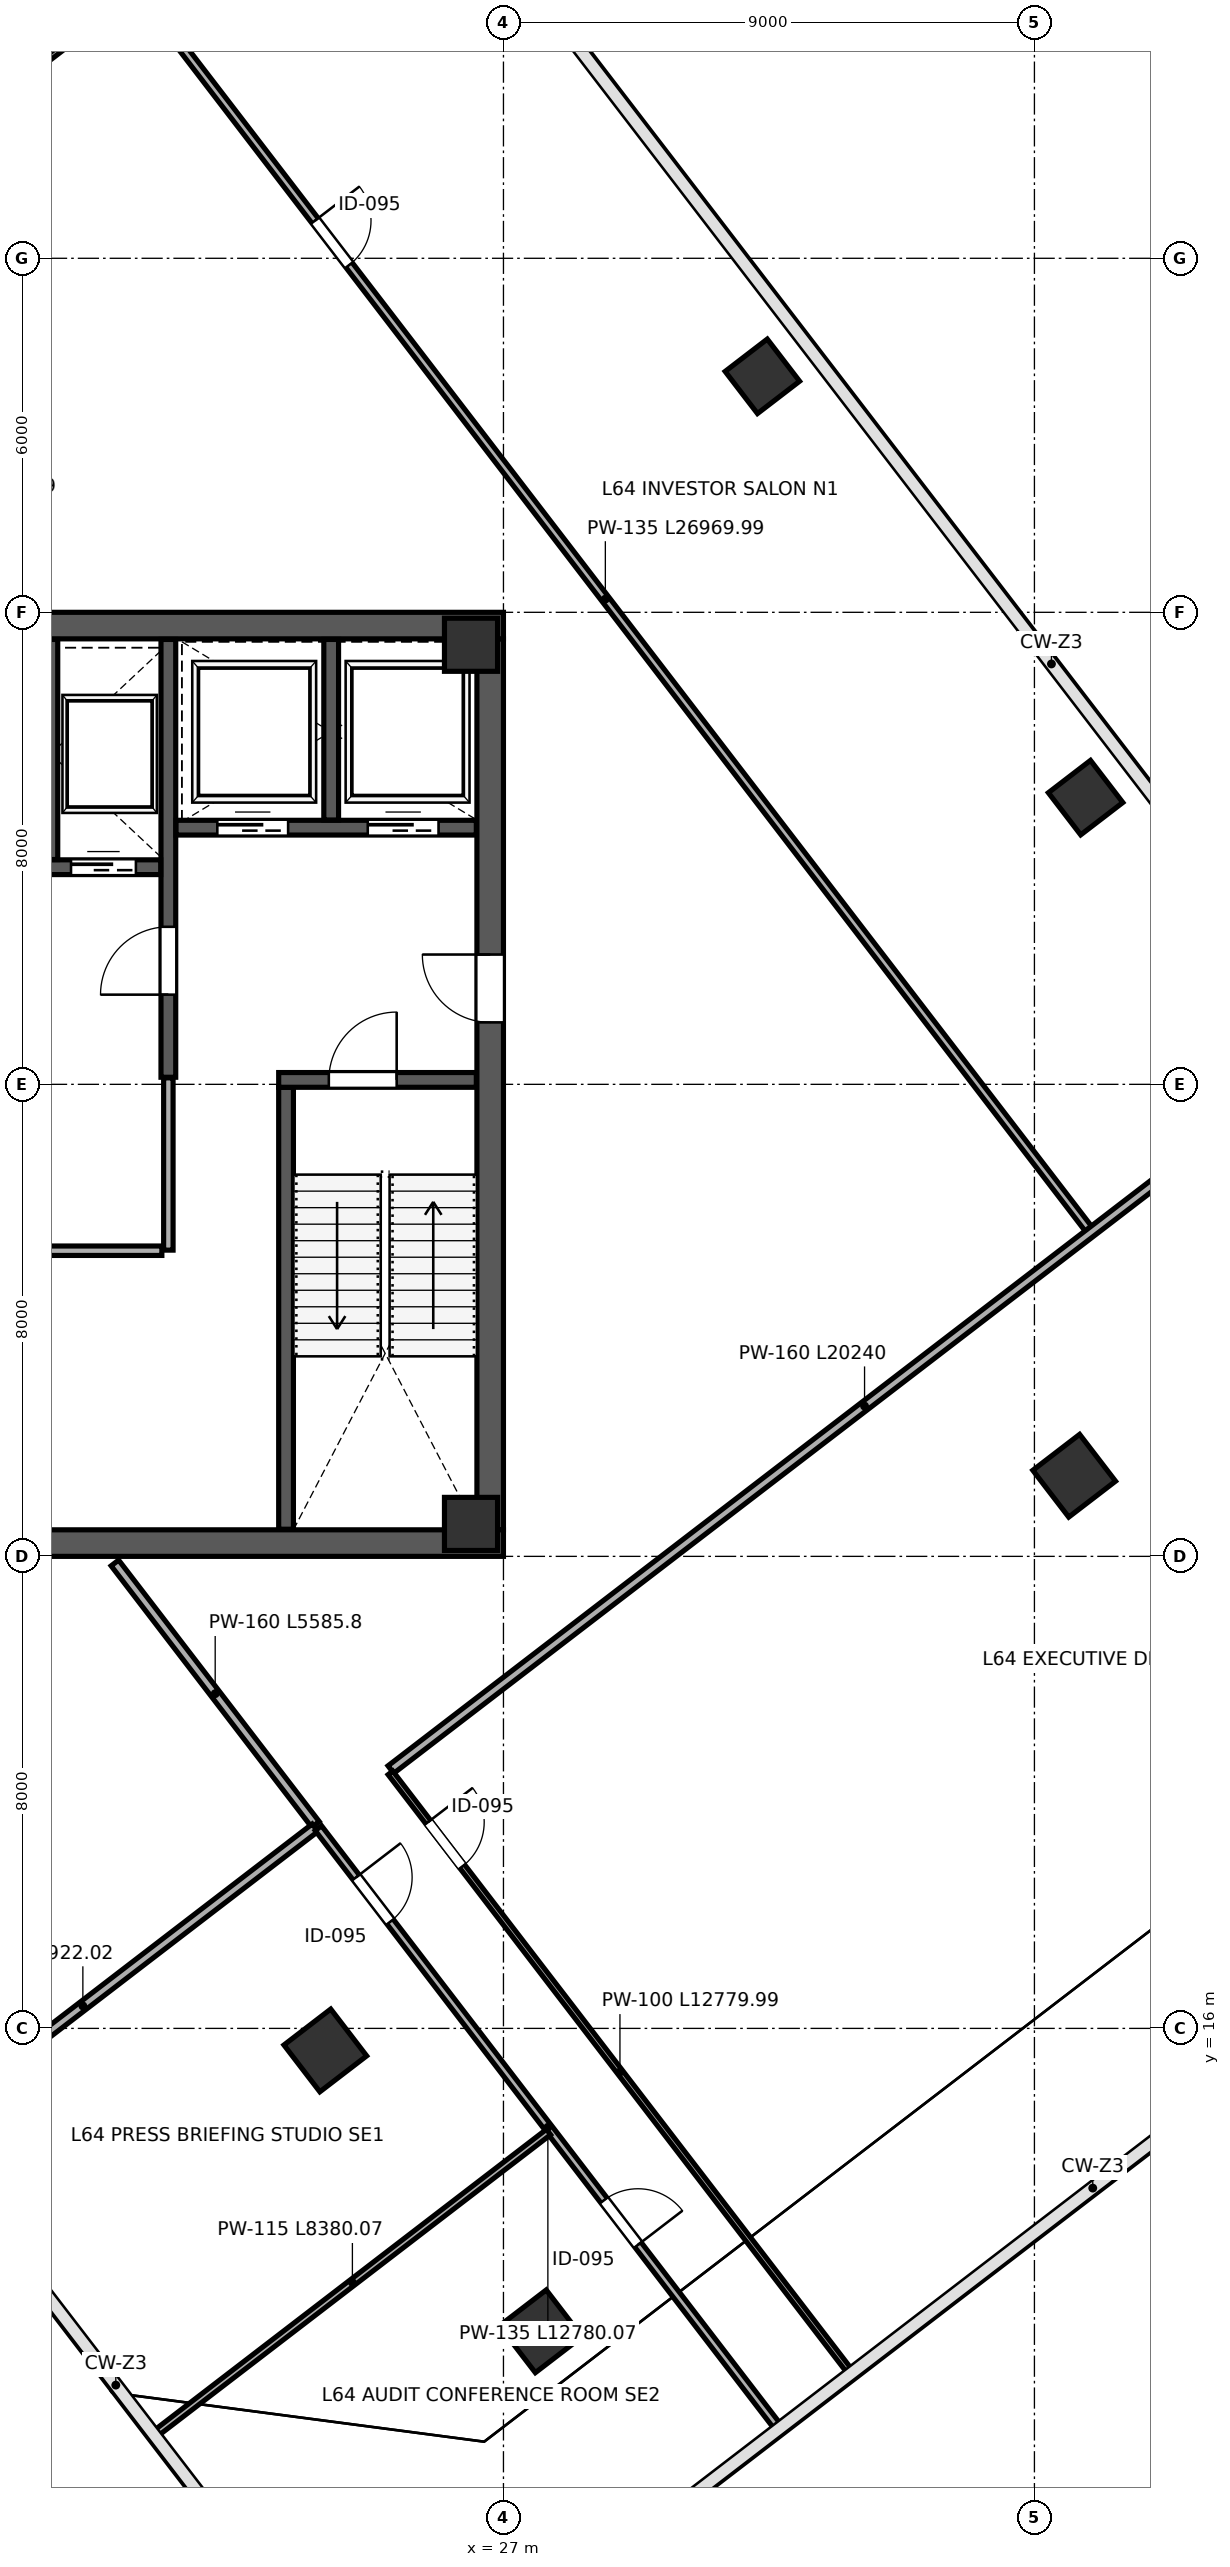
"""IFC4 building model, lengths in metres.
Left out: names, types, materials, properties, quantities, classifications, styles, units other than length and angle.
Written with IfcOpenShell. Run it as: python <this file> out.ifc"""

import sys

from ifc_helpers import new_model, si_unit, direction, frame, frame_2d, origin, origin_2d, place, context, subcontext, project, spatial, rectangle, extrude, source, transform, mapped, element, fill, save


model = new_model("IFC4")
c1 = context("Model", 3, precision=1e-05, world=origin(), true_north=direction((0.0, 1.0)))
c2 = subcontext(c1, "Body", "Model", "MODEL_VIEW")
j1 = project(units=[si_unit("LENGTHUNIT", "METRE"), si_unit("PLANEANGLEUNIT", "RADIAN")], contexts=[c1])
p1 = place(None, origin())
s1 = spatial("IfcSite", under=j1, at=p1, CompositionType="ELEMENT")
p2 = place(p1, origin())
s2 = spatial("IfcBuilding", under=s1, at=p2, CompositionType="ELEMENT")
p3 = place(p2, frame((0.0, 0.0, 283.6)))
s3 = spatial("IfcBuildingStorey", under=s2, at=p3, CompositionType="ELEMENT", Elevation=283.6)
m1 = source(origin(), c2, "Body", "SweptSolid", [
    extrude(rectangle(XDim=0.9, YDim=0.9, at=origin_2d()), origin(), (0.0, 0.0, 1.0), 4.198),
])
for number, where, z_axis, x_axis in (
    (1, (26.45, 24.55, 0.001), (0.0, 0.0, 1.0), (1.0, 0.0, 0.0)),
    (2, (26.45, 39.45, 0.001), (0.0, 0.0, 1.0), (1.0, 0.0, 0.0)),
):
    element("IfcColumn", number, at=place(p3, frame(where, z_axis=z_axis, x_axis=x_axis)), inside=s3, PredefinedType="COLUMN", context=c2, shape_type="MappedRepresentation", body=[
        mapped(m1, transform((0.0, 0.0, 0.0), scale=1.0)),
    ])
m2 = source(origin(), c2, "Body", "SweptSolid", [
    extrude(rectangle(XDim=0.9, YDim=0.9, at=origin_2d()), origin(), (0.0, 0.0, 1.0), 4.198),
])
for number, where, z_axis, x_axis in (
    (3, (31.389, 44.0, 0.001), (0.0, 0.0, 1.0), (-0.609, 0.793, 0.0)),
    (4, (36.867, 36.859, 0.001), (0.0, 0.0, 1.0), (-0.609, 0.793, 0.0)),
):
    element("IfcColumn", number, at=place(p3, frame(where, z_axis=z_axis, x_axis=x_axis)), inside=s3, PredefinedType="COLUMN", context=c2, shape_type="MappedRepresentation", body=[
        mapped(m2, transform((0.0, 0.0, 0.0), scale=1.0)),
    ])
m3 = source(origin(), c2, "Body", "SweptSolid", [
    extrude(rectangle(XDim=1.0, YDim=1.0, at=origin_2d()), origin(), (0.0, 0.0, 1.0), 4.198),
])
for number, where, z_axis, x_axis in (
    (5, (23.98, 15.626, 0.001), (0.0, 0.0, 1.0), (-0.609, 0.793, 0.0)),
    (6, (36.674, 25.366, 0.001), (0.0, 0.0, 1.0), (-0.609, 0.793, 0.0)),
):
    element("IfcColumn", number, at=place(p3, frame(where, z_axis=z_axis, x_axis=x_axis)), inside=s3, PredefinedType="COLUMN", context=c2, shape_type="MappedRepresentation", body=[
        mapped(m3, transform((0.0, 0.0, 0.0), scale=1.0)),
    ])
m4 = source(origin(), c2, "Body", "SweptSolid", [
    extrude(rectangle(XDim=1.0, YDim=1.0, at=origin_2d()), origin(), (0.0, 0.0, 1.0), 4.198),
])
p4 = place(p3, frame((27.633, 10.866, 0.001), z_axis=(0.0, 0.0, 1.0), x_axis=(-0.608761429009, 0.793353340291, 0.0)))
e7 = element("IfcColumn", 7, at=p4, inside=s3, PredefinedType="COLUMN", context=c2, shape_type="MappedRepresentation", body=[
    mapped(m4, transform((0.0, 0.0, 0.0), scale=1.0)),
])
p5 = place(p3, frame((26.775, 24.45, 0.0), z_axis=(0.0, 0.0, 1.0), x_axis=(0.0, 1.0, 0.0)))
e8 = element("IfcWall", 8, at=p5, inside=s3, PredefinedType="SHEAR", context=c2, shape_type="SweptSolid", body=[
    extrude(rectangle(XDim=15.1, YDim=0.45, at=frame_2d((7.55, 0.0))), origin(), (0.0, 0.0, 1.0), 3.92),
])
p6 = place(p5, frame((8.6, 0.0, 0.0)))
e9 = element("IfcOpeningElement", 9, at=p6, cuts=e8, PredefinedType="OPENING", context=c2, shape_type="SweptSolid", body=[
    extrude(rectangle(XDim=1.15, YDim=2.2, at=frame_2d((0.575, 1.1))), frame((0.0, 0.235, 0.0), z_axis=(0.0, -1.0, 0.0), x_axis=(1.0, 0.0, 0.0)), (0.0, 0.0, 1.0), 0.47),
])
for number, where, z_axis, x_axis in (
    (10, (9.0, 24.225, 0.0), (0.0, 0.0, 1.0), (1.0, 0.0, 0.0)),
    (11, (9.0, 39.775, 0.0), (0.0, 0.0, 1.0), (1.0, 0.0, 0.0)),
):
    element("IfcWall", number, at=place(p3, frame(where, z_axis=z_axis, x_axis=x_axis)), inside=s3, PredefinedType="SHEAR", context=c2, shape_type="SweptSolid", body=[
        extrude(rectangle(XDim=18.0, YDim=0.45, at=frame_2d((9.0, 0.0))), origin(), (0.0, 0.0, 1.0), 3.92),
    ])
p7 = place(p3, frame((23.315, 24.46, 0.0), z_axis=(0.0, 0.0, 1.0), x_axis=(0.0, 1.0, 0.0)))
e12 = element("IfcWall", 12, at=p7, inside=s3, PredefinedType="SHEAR", context=c2, shape_type="SweptSolid", body=[
    extrude(rectangle(XDim=7.49, YDim=0.25, at=frame_2d((3.745, 0.0))), origin(), (0.0, 0.0, 1.0), 3.92),
])
p8 = place(p3, frame((23.19, 32.075, 0.0), z_axis=(0.0, 0.0, 1.0), x_axis=(1.0, 0.0, 0.0)))
e13 = element("IfcWall", 13, at=p8, inside=s3, PredefinedType="SHEAR", context=c2, shape_type="SweptSolid", body=[
    extrude(rectangle(XDim=3.35, YDim=0.25, at=frame_2d((1.675, 0.0))), origin(), (0.0, 0.0, 1.0), 3.92),
])
p9 = place(p8, frame((0.85, 0.0, 0.0)))
e14 = element("IfcOpeningElement", 14, at=p9, cuts=e13, PredefinedType="OPENING", context=c2, shape_type="SweptSolid", body=[
    extrude(rectangle(XDim=1.15, YDim=2.2, at=frame_2d((0.575, 1.1))), frame((0.0, 0.135, 0.0), z_axis=(0.0, -1.0, 0.0), x_axis=(1.0, 0.0, 0.0)), (0.0, 0.0, 1.0), 0.27),
])
p10 = place(p3, frame((21.32, 32.12, 0.0), z_axis=(0.0, 0.0, 1.0), x_axis=(0.0, 1.0, 0.0)))
e15 = element("IfcWall", 15, at=p10, inside=s3, PredefinedType="SHEAR", context=c2, shape_type="SweptSolid", body=[
    extrude(rectangle(XDim=7.42, YDim=0.25, at=frame_2d((3.71, 0.0))), origin(), (0.0, 0.0, 1.0), 3.92),
])
p11 = place(p10, frame((1.4, 0.0, 0.0)))
e16 = element("IfcOpeningElement", 16, at=p11, cuts=e15, PredefinedType="OPENING", context=c2, shape_type="SweptSolid", body=[
    extrude(rectangle(XDim=1.15, YDim=2.2, at=frame_2d((0.575, 1.1))), frame((0.0, 0.135, 0.0), z_axis=(0.0, -1.0, 0.0), x_axis=(1.0, 0.0, 0.0)), (0.0, 0.0, 1.0), 0.27),
])
p12 = place(p3, frame((21.45, 36.35, 0.0), z_axis=(0.0, 0.0, 1.0), x_axis=(1.0, 0.0, 0.0)))
e17 = element("IfcWall", 17, at=p12, inside=s3, PredefinedType="SHEAR", context=c2, shape_type="SweptSolid", body=[
    extrude(rectangle(XDim=5.09, YDim=0.25, at=frame_2d((2.545, 0.0))), origin(), (0.0, 0.0, 1.0), 3.92),
])
p13 = place(p12, frame((0.7, 0.0, 0.0)))
e18 = element("IfcOpeningElement", 18, at=p13, cuts=e17, PredefinedType="OPENING", context=c2, shape_type="SweptSolid", body=[
    extrude(rectangle(XDim=1.2, YDim=2.2, at=frame_2d((0.6, 1.1))), frame((0.0, 0.135, 0.0), z_axis=(0.0, -1.0, 0.0), x_axis=(1.0, 0.0, 0.0)), (0.0, 0.0, 1.0), 0.27),
])
p14 = place(p12, frame((3.25, 0.0, 0.0)))
e19 = element("IfcOpeningElement", 19, at=p14, cuts=e17, PredefinedType="OPENING", context=c2, shape_type="SweptSolid", body=[
    extrude(rectangle(XDim=1.2, YDim=2.2, at=frame_2d((0.6, 1.1))), frame((0.0, 0.135, 0.0), z_axis=(0.0, -1.0, 0.0), x_axis=(1.0, 0.0, 0.0)), (0.0, 0.0, 1.0), 0.27),
])
p15 = place(p3, frame((24.08, 36.48, 0.0), z_axis=(0.0, 0.0, 1.0), x_axis=(0.0, 1.0, 0.0)))
e20 = element("IfcWall", 20, at=p15, inside=s3, PredefinedType="SHEAR", context=c2, shape_type="SweptSolid", body=[
    extrude(rectangle(XDim=3.06, YDim=0.25, at=frame_2d((1.53, 0.0))), origin(), (0.0, 0.0, 1.0), 3.92),
])
p16 = place(p3, frame((17.32, 35.68, 0.0), z_axis=(0.0, 0.0, 1.0), x_axis=(1.0, 0.0, 0.0)))
e21 = element("IfcWall", 21, at=p16, inside=s3, PredefinedType="SHEAR", context=c2, shape_type="SweptSolid", body=[
    extrude(rectangle(XDim=3.87, YDim=0.25, at=frame_2d((1.935, 0.0))), origin(), (0.0, 0.0, 1.0), 3.92),
])
p17 = place(p16, frame((0.45, 0.0, 0.0)))
e22 = element("IfcOpeningElement", 22, at=p17, cuts=e21, PredefinedType="OPENING", context=c2, shape_type="SweptSolid", body=[
    extrude(rectangle(XDim=1.1, YDim=2.2, at=frame_2d((0.55, 1.1))), frame((0.0, 0.135, 0.0), z_axis=(0.0, -1.0, 0.0), x_axis=(1.0, 0.0, 0.0)), (0.0, 0.0, 1.0), 0.27),
])
p18 = place(p16, frame((2.35, 0.0, 0.0)))
e23 = element("IfcOpeningElement", 23, at=p18, cuts=e21, PredefinedType="OPENING", context=c2, shape_type="SweptSolid", body=[
    extrude(rectangle(XDim=1.1, YDim=2.2, at=frame_2d((0.55, 1.1))), frame((0.0, 0.135, 0.0), z_axis=(0.0, -1.0, 0.0), x_axis=(1.0, 0.0, 0.0)), (0.0, 0.0, 1.0), 0.27),
])
p19 = place(p3, frame((19.32, 35.81, 0.0), z_axis=(0.0, 0.0, 1.0), x_axis=(0.0, 1.0, 0.0)))
e24 = element("IfcWall", 24, at=p19, inside=s3, PredefinedType="SHEAR", context=c2, shape_type="SweptSolid", body=[
    extrude(rectangle(XDim=3.73, YDim=0.25, at=frame_2d((1.865, 0.0))), origin(), (0.0, 0.0, 1.0), 3.92),
])
p20 = place(p3, frame((12.84, 29.18, 0.0), z_axis=(0.0, 0.0, 1.0), x_axis=(1.0, 0.0, 0.0)))
e25 = element("IfcWall", 25, at=p20, inside=s3, PredefinedType="PARTITIONING", context=c2, shape_type="SweptSolid", body=[
    extrude(rectangle(XDim=8.37, YDim=0.16, at=frame_2d((4.185, 0.0))), origin(), (0.0, 0.0, 1.0), 3.92),
])
p21 = place(p20, frame((2.6, 0.0, 0.0)))
e26 = element("IfcOpeningElement", 26, at=p21, cuts=e25, PredefinedType="OPENING", context=c2, shape_type="SweptSolid", body=[
    extrude(rectangle(XDim=0.9, YDim=2.15, at=frame_2d((0.45, 1.075))), frame((0.0, 0.09, 0.0), z_axis=(0.0, -1.0, 0.0), x_axis=(1.0, 0.0, 0.0)), (0.0, 0.0, 1.0), 0.18),
])
p22 = place(p3, frame((21.32, 29.19, 0.0), z_axis=(0.0, 0.0, 1.0), x_axis=(0.0, 1.0, 0.0)))
e27 = element("IfcWall", 27, at=p22, inside=s3, PredefinedType="PARTITIONING", context=c2, shape_type="SweptSolid", body=[
    extrude(rectangle(XDim=2.92, YDim=0.16, at=frame_2d((1.46, 0.0))), origin(), (0.0, 0.0, 1.0), 3.92),
])
p23 = place(p3, frame((20.414, 23.888, 0.0), z_axis=(0.0, 0.0, 1.0), x_axis=(0.608740736079, -0.793369218106, 0.0)))
e28 = element("IfcWall", 28, at=p23, inside=s3, PredefinedType="PARTITIONING", context=c2, shape_type="SweptSolid", body=[
    extrude(rectangle(XDim=5.585, YDim=0.16, at=frame_2d((2.793, 0.0))), origin(), (0.0, 0.0, 1.0), 3.92),
])
p24 = place(p3, frame((20.518, 50.922, 0.0), z_axis=(0.0, 0.0, 1.0), x_axis=(0.608759693778, -0.793354671778, 0.0)))
e29 = element("IfcWall", 29, at=p24, inside=s3, PredefinedType="PARTITIONING", context=c2, shape_type="SweptSolid", body=[
    extrude(rectangle(XDim=26.97, YDim=0.135, at=frame_2d((13.485, 0.0))), origin(), (0.0, 0.0, 1.0), 3.92),
])
p25 = place(p24, frame((5.4, 0.0, 0.0)))
e30 = element("IfcOpeningElement", 30, at=p25, cuts=e29, PredefinedType="OPENING", context=c2, shape_type="SweptSolid", body=[
    extrude(rectangle(XDim=0.95, YDim=2.15, at=frame_2d((0.475, 1.075))), frame((0.0, 0.078, 0.0), z_axis=(0.0, -1.0, 0.0), x_axis=(1.0, 0.0, 0.0)), (0.0, 0.0, 1.0), 0.155),
])
p26 = place(p3, frame((1.519, 35.764, 0.0), z_axis=(0.0, 0.0, 1.0), x_axis=(0.793353184068, 0.608761632602, 0.0)))
e31 = element("IfcWall", 31, at=p26, inside=s3, PredefinedType="PARTITIONING", context=c2, shape_type="SweptSolid", body=[
    extrude(rectangle(XDim=27.572, YDim=0.1, at=frame_2d((13.786, 0.0))), origin(), (0.0, 0.0, 1.0), 3.92),
])
p27 = place(p3, frame((25.092, 20.387, 0.0), z_axis=(0.0, 0.0, 1.0), x_axis=(0.793357014217, 0.608756641025, 0.0)))
e32 = element("IfcWall", 32, at=p27, inside=s3, PredefinedType="PARTITIONING", context=c2, shape_type="SweptSolid", body=[
    extrude(rectangle(XDim=20.24, YDim=0.16, at=frame_2d((10.12, 0.0))), origin(), (0.0, 0.0, 1.0), 3.155),
])
p28 = place(p3, frame((15.935, 13.361, 0.0), z_axis=(0.0, 0.0, 1.0), x_axis=(0.793355203048, 0.608759001409, 0.0)))
e33 = element("IfcWall", 33, at=p28, inside=s3, PredefinedType="PARTITIONING", context=c2, shape_type="SweptSolid", body=[
    extrude(rectangle(XDim=9.922, YDim=0.16, at=frame_2d((4.961, 0.0))), origin(), (0.0, 0.0, 1.0), 3.92),
])
p29 = place(p3, frame((25.085, 20.331, 0.0), z_axis=(0.0, 0.0, 1.0), x_axis=(0.608748325205, -0.793363395022, 0.0)))
e34 = element("IfcWall", 34, at=p29, inside=s3, PredefinedType="PARTITIONING", context=c2, shape_type="SweptSolid", body=[
    extrude(rectangle(XDim=12.78, YDim=0.1, at=frame_2d((6.39, 0.0))), origin(), (0.0, 0.0, 1.0), 3.212),
])
p30 = place(p29, frame((1.05, 0.0, 0.0)))
e35 = element("IfcOpeningElement", 35, at=p30, cuts=e34, PredefinedType="OPENING", context=c2, shape_type="SweptSolid", body=[
    extrude(rectangle(XDim=0.95, YDim=2.15, at=frame_2d((0.475, 1.075))), frame((0.0, 0.06, 0.0), z_axis=(0.0, -1.0, 0.0), x_axis=(1.0, 0.0, 0.0)), (0.0, 0.0, 1.0), 0.12),
])
p31 = place(p3, frame((23.863, 19.393, 0.0), z_axis=(0.0, 0.0, 1.0), x_axis=(0.608748325205, -0.793363395022, 0.0)))
e36 = element("IfcWall", 36, at=p31, inside=s3, PredefinedType="PARTITIONING", context=c2, shape_type="SweptSolid", body=[
    extrude(rectangle(XDim=12.78, YDim=0.135, at=frame_2d((6.39, 0.0))), origin(), (0.0, 0.0, 1.0), 3.212),
])
p32 = place(p31, frame((1.05, 0.0, 0.0)))
e37 = element("IfcOpeningElement", 37, at=p32, cuts=e36, PredefinedType="OPENING", context=c2, shape_type="SweptSolid", body=[
    extrude(rectangle(XDim=0.95, YDim=2.15, at=frame_2d((0.475, 1.075))), frame((0.0, 0.078, 0.0), z_axis=(0.0, -1.0, 0.0), x_axis=(1.0, 0.0, 0.0)), (0.0, 0.0, 1.0), 0.155),
])
p33 = place(p31, frame((7.95, 0.0, 0.0)))
e38 = element("IfcOpeningElement", 38, at=p33, cuts=e36, PredefinedType="OPENING", context=c2, shape_type="SweptSolid", body=[
    extrude(rectangle(XDim=0.95, YDim=2.15, at=frame_2d((0.475, 1.075))), frame((0.0, 0.078, 0.0), z_axis=(0.0, -1.0, 0.0), x_axis=(1.0, 0.0, 0.0)), (0.0, 0.0, 1.0), 0.155),
])
p34 = place(p3, frame((21.115, 9.142, 0.0), z_axis=(0.0, 0.0, 1.0), x_axis=(0.793351209169, 0.608764206331, 0.0)))
e39 = element("IfcWall", 39, at=p34, inside=s3, PredefinedType="PARTITIONING", context=c2, shape_type="SweptSolid", body=[
    extrude(rectangle(XDim=8.38, YDim=0.115, at=frame_2d((4.19, 0.0))), origin(), (0.0, 0.0, 1.0), 3.92),
])
m5 = source(origin(), c2, "Body", "SweptSolid", [
    extrude(rectangle(XDim=1.15, YDim=2.2, at=frame_2d((0.575, 1.1))), frame((0.0, 0.025, 0.0), z_axis=(0.0, -1.0, 0.0), x_axis=(1.0, 0.0, 0.0)), (0.0, 0.0, 1.0), 0.05),
])
p35 = place(p11, origin())
e40 = element("IfcDoor", 40, at=p35, inside=s3, OperationType="SINGLE_SWING_LEFT", PredefinedType="DOOR", context=c2, shape_type="MappedRepresentation", body=[
    mapped(m5, transform((0.0, 0.0, 0.0), scale=1.0)),
])
fill(e16, e40)
m6 = source(origin(), c2, "Body", "SweptSolid", [
    extrude(rectangle(XDim=1.15, YDim=2.2, at=frame_2d((0.575, 1.1))), frame((0.0, 0.025, 0.0), z_axis=(0.0, -1.0, 0.0), x_axis=(1.0, 0.0, 0.0)), (0.0, 0.0, 1.0), 0.05),
])
p36 = place(p9, origin())
e41 = element("IfcDoor", 41, at=p36, inside=s3, OperationType="SINGLE_SWING_RIGHT", PredefinedType="DOOR", context=c2, shape_type="MappedRepresentation", body=[
    mapped(m6, transform((0.0, 0.0, 0.0), scale=1.0)),
])
fill(e14, e41)
p37 = place(p6, origin())
e42 = element("IfcDoor", 42, at=p37, inside=s3, OperationType="SINGLE_SWING_RIGHT", PredefinedType="DOOR", context=c2, shape_type="MappedRepresentation", body=[
    mapped(m5, transform((0.0, 0.0, 0.0), scale=1.0)),
])
fill(e9, e42)
m7 = source(origin(), c2, "Body", "SweptSolid", [
    extrude(rectangle(XDim=1.1, YDim=2.2, at=frame_2d((0.55, 1.1))), frame((0.0, 0.025, 0.0), z_axis=(0.0, -1.0, 0.0), x_axis=(1.0, 0.0, 0.0)), (0.0, 0.0, 1.0), 0.05),
])
p38 = place(p18, origin())
e43 = element("IfcDoor", 43, at=p38, inside=s3, OperationType="SLIDING_TO_RIGHT", PredefinedType="DOOR", context=c2, shape_type="MappedRepresentation", body=[
    mapped(m7, transform((0.0, 0.0, 0.0), scale=1.0)),
])
fill(e23, e43)
m8 = source(origin(), c2, "Body", "SweptSolid", [
    extrude(rectangle(XDim=1.2, YDim=2.2, at=frame_2d((0.6, 1.1))), frame((0.0, 0.025, 0.0), z_axis=(0.0, -1.0, 0.0), x_axis=(1.0, 0.0, 0.0)), (0.0, 0.0, 1.0), 0.05),
])
p39 = place(p13, origin())
e44 = element("IfcDoor", 44, at=p39, inside=s3, OperationType="SLIDING_TO_LEFT", PredefinedType="DOOR", context=c2, shape_type="MappedRepresentation", body=[
    mapped(m8, transform((0.0, 0.0, 0.0), scale=1.0)),
])
fill(e18, e44)
p40 = place(p14, origin())
e45 = element("IfcDoor", 45, at=p40, inside=s3, OperationType="SLIDING_TO_RIGHT", PredefinedType="DOOR", context=c2, shape_type="MappedRepresentation", body=[
    mapped(m8, transform((0.0, 0.0, 0.0), scale=1.0)),
])
fill(e19, e45)
m9 = source(origin(), c2, "Body", "SweptSolid", [
    extrude(rectangle(XDim=0.95, YDim=2.15, at=frame_2d((0.475, 1.075))), frame((0.0, 0.025, 0.0), z_axis=(0.0, -1.0, 0.0), x_axis=(1.0, 0.0, 0.0)), (0.0, 0.0, 1.0), 0.05),
])
p41 = place(p25, origin())
e46 = element("IfcDoor", 46, at=p41, inside=s3, OperationType="SINGLE_SWING_LEFT", PredefinedType="DOOR", context=c2, shape_type="MappedRepresentation", body=[
    mapped(m9, transform((0.0, 0.0, 0.0), scale=1.0)),
])
fill(e30, e46)
p42 = place(p30, origin())
e47 = element("IfcDoor", 47, at=p42, inside=s3, OperationType="SINGLE_SWING_LEFT", PredefinedType="DOOR", context=c2, shape_type="MappedRepresentation", body=[
    mapped(m9, transform((0.0, 0.0, 0.0), scale=1.0)),
])
fill(e35, e47)
p43 = place(p32, origin())
e48 = element("IfcDoor", 48, at=p43, inside=s3, OperationType="SINGLE_SWING_LEFT", PredefinedType="DOOR", context=c2, shape_type="MappedRepresentation", body=[
    mapped(m9, transform((0.0, 0.0, 0.0), scale=1.0)),
])
fill(e37, e48)
p44 = place(p33, origin())
e49 = element("IfcDoor", 49, at=p44, inside=s3, OperationType="SINGLE_SWING_RIGHT", PredefinedType="DOOR", context=c2, shape_type="MappedRepresentation", body=[
    mapped(m9, transform((0.0, 0.0, 0.0), scale=1.0)),
])
fill(e38, e49)
save(model, sys.argv[1])
